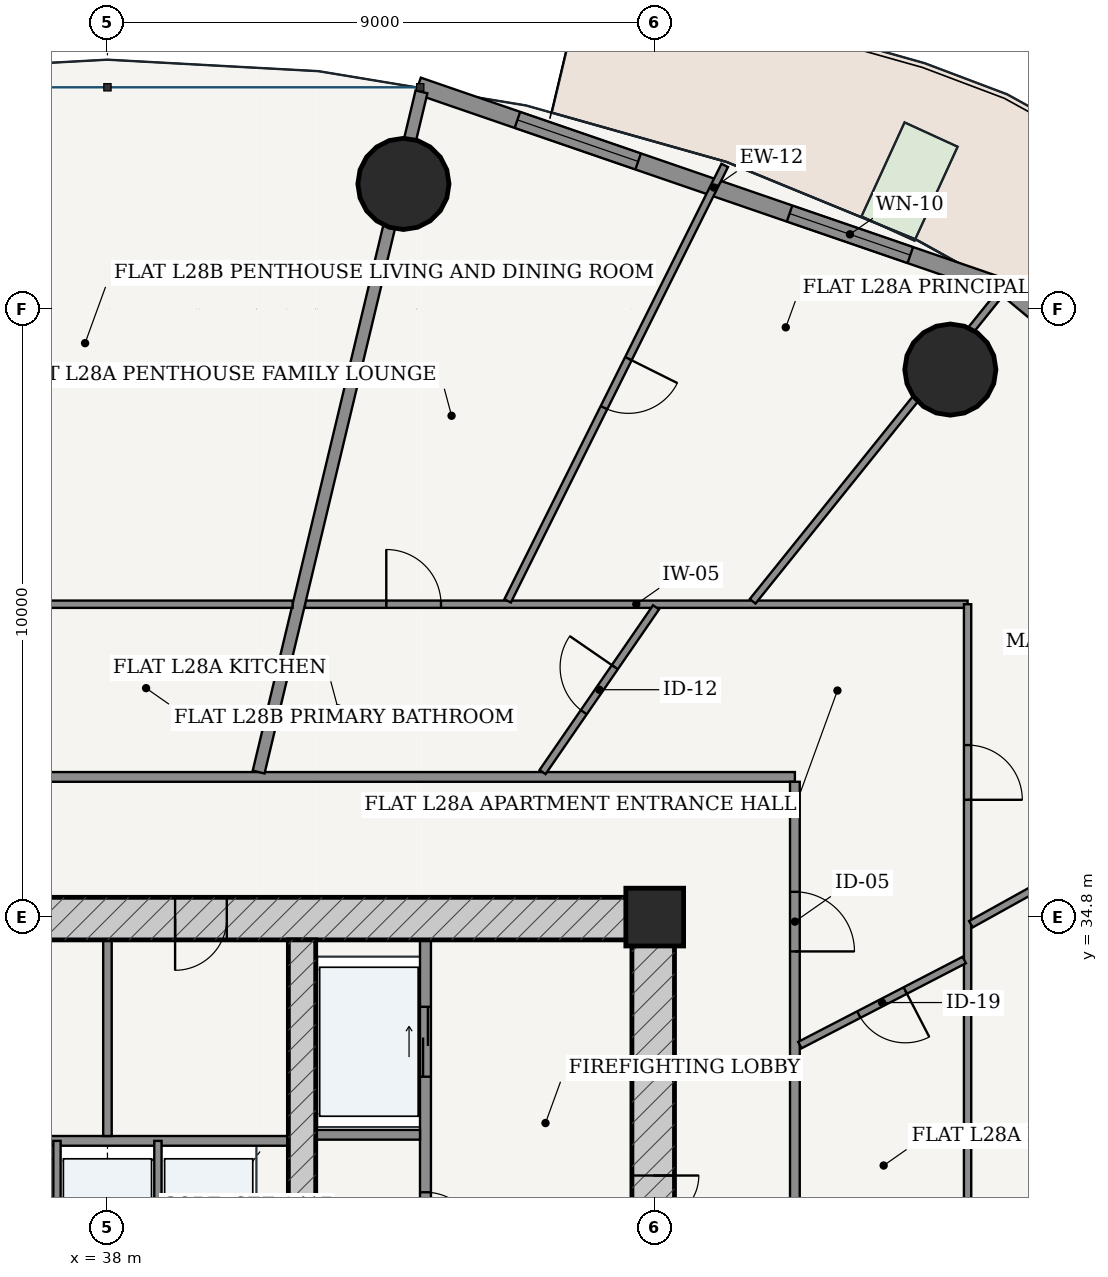
"""IFC4 building model, lengths in metres.
Left out: names, types, materials, properties, quantities, classifications, styles, units other than length and angle.
Written with IfcOpenShell. Run it as: python <this file> out.ifc"""

import sys

from ifc_helpers import new_model, si_unit, direction, frame, frame_2d, origin, origin_2d, place, context, subcontext, project, spatial, rectangle, hollow_circle, extrude, source, transform, mapped, element, fill, save


model = new_model("IFC4")
c1 = context("Model", 3, precision=1e-05, world=origin(), true_north=direction((-0.2419218956, 0.970295726276)))
c2 = subcontext(c1, "Body", "Model", "MODEL_VIEW")
j1 = project(units=[si_unit("LENGTHUNIT", "METRE"), si_unit("PLANEANGLEUNIT", "RADIAN")], contexts=[c1])
p1 = place(None, origin())
s1 = spatial("IfcSite", under=j1, at=p1, CompositionType="ELEMENT")
p2 = place(p1, origin())
s2 = spatial("IfcBuilding", under=s1, at=p2, CompositionType="ELEMENT")
p3 = place(p2, frame((0.0, 0.0, 108.6)))
s3 = spatial("IfcBuildingStorey", under=s2, at=p3, CompositionType="ELEMENT", Elevation=108.6)
p4 = place(p3, frame((47.0, 34.8, 0.0), z_axis=(0.0, 0.0, 1.0), x_axis=(1.0, 0.0, 0.0)))
e1 = element("IfcColumn", 1, at=p4, inside=s3, PredefinedType="COLUMN", context=c2, shape_type="SweptSolid", body=[
    extrude(rectangle(XDim=0.95, YDim=0.95, at=origin_2d()), origin(), (0.0, 0.0, 1.0), 3.6),
])
p5 = place(p3, frame((28.675, 34.775, 0.0), z_axis=(0.0, 0.0, 1.0), x_axis=(1.0, 0.0, 0.0)))
e2 = element("IfcWall", 2, at=p5, inside=s3, PredefinedType="SHEAR", context=c2, shape_type="SweptSolid", body=[
    extrude(rectangle(XDim=18.65, YDim=0.7, at=frame_2d((9.325, 0.0))), origin(), (0.0, 0.0, 1.0), 3.325),
])
p6 = place(p5, frame((7.357, 0.0, 0.0)))
e3 = element("IfcOpeningElement", 3, at=p6, cuts=e2, PredefinedType="OPENING", context=c2, shape_type="SweptSolid", body=[
    extrude(rectangle(XDim=0.86, YDim=2.1, at=frame_2d((0.43, 1.05))), frame((0.0, 0.36, 0.0), z_axis=(0.0, -1.0, 0.0), x_axis=(1.0, 0.0, 0.0)), (0.0, 0.0, 1.0), 0.72),
])
p7 = place(p5, frame((10.438, 0.0, 0.0)))
e4 = element("IfcOpeningElement", 4, at=p7, cuts=e2, PredefinedType="OPENING", context=c2, shape_type="SweptSolid", body=[
    extrude(rectangle(XDim=0.85, YDim=2.1, at=frame_2d((0.425, 1.05))), frame((0.0, 0.36, 0.0), z_axis=(0.0, -1.0, 0.0), x_axis=(1.0, 0.0, 0.0)), (0.0, 0.0, 1.0), 0.72),
])
p8 = place(p3, frame((46.975, 19.175, 0.0), z_axis=(0.0, 0.0, 1.0), x_axis=(0.0, 1.0, 0.0)))
e5 = element("IfcWall", 5, at=p8, inside=s3, PredefinedType="SHEAR", context=c2, shape_type="SweptSolid", body=[
    extrude(rectangle(XDim=15.25, YDim=0.7, at=frame_2d((7.625, 0.0))), origin(), (0.0, 0.0, 1.0), 3.325),
])
p9 = place(p8, frame((9.875, 0.0, 0.0)))
e6 = element("IfcOpeningElement", 6, at=p9, cuts=e5, PredefinedType="OPENING", context=c2, shape_type="SweptSolid", body=[
    extrude(rectangle(XDim=1.5, YDim=2.2, at=frame_2d((0.75, 1.1))), frame((0.0, 0.36, 0.0), z_axis=(0.0, -1.0, 0.0), x_axis=(1.0, 0.0, 0.0)), (0.0, 0.0, 1.0), 0.72),
])
p10 = place(p3, frame((41.2, 19.175, 0.0), z_axis=(0.0, 0.0, 1.0), x_axis=(0.0, 1.0, 0.0)))
e7 = element("IfcWall", 7, at=p10, inside=s3, PredefinedType="SHEAR", context=c2, shape_type="SweptSolid", body=[
    extrude(rectangle(XDim=15.25, YDim=0.45, at=frame_2d((7.625, 0.0))), origin(), (0.0, 0.0, 1.0), 3.325),
])
p11 = place(p10, frame((7.8, 0.0, 0.0)))
e8 = element("IfcOpeningElement", 8, at=p11, cuts=e7, PredefinedType="OPENING", context=c2, shape_type="SweptSolid", body=[
    extrude(rectangle(XDim=1.05, YDim=2.15, at=frame_2d((0.525, 1.075))), frame((0.0, 0.235, 0.0), z_axis=(0.0, -1.0, 0.0), x_axis=(1.0, 0.0, 0.0)), (0.0, 0.0, 1.0), 0.47),
])
for number, where, z_axis, x_axis in (
    (9, (51.862, 43.803, 0.0), (0.0, 0.0, 1.0), (1.0, 0.0, 0.0)),
    (10, (42.867, 46.857, 0.0), (0.0, 0.0, 1.0), (1.0, 0.0, 0.0)),
):
    element("IfcColumn", number, at=place(p3, frame(where, z_axis=z_axis, x_axis=x_axis)), inside=s3, PredefinedType="COLUMN", context=c2, shape_type="SweptSolid", body=[
        extrude(hollow_circle(Radius=0.75, WallThickness=0.045, at=origin_2d()), origin(), (0.0, 0.0, 1.0), 3.6),
    ])
p12 = place(p3, frame((60.154, 39.01, 0.0), z_axis=(0.0, 0.0, 1.0), x_axis=(-0.769242574941, 0.638956853706, 0.0)))
e11 = element("IfcWall", 11, at=p12, inside=s3, PredefinedType="SOLIDWALL", context=c2, shape_type="SweptSolid", body=[
    extrude(rectangle(XDim=9.69, YDim=0.26, at=frame_2d((4.845, 0.0))), origin(), (0.0, 0.0, 1.0), 3.325),
])
p13 = place(p12, frame((4.17, 0.0, 0.0)))
e12 = element("IfcOpeningElement", 12, at=p13, cuts=e11, PredefinedType="OPENING", context=c2, shape_type="SweptSolid", body=[
    extrude(rectangle(XDim=1.35, YDim=2.2, at=frame_2d((0.675, 1.1))), frame((0.0, 0.14, 0.0), z_axis=(0.0, -1.0, 0.0), x_axis=(1.0, 0.0, 0.0)), (0.0, 0.0, 1.0), 0.28),
])
p14 = place(p3, frame((52.837, 45.125, 0.0), z_axis=(0.0, 0.0, 1.0), x_axis=(-0.945597432299, 0.325339047809, 0.0)))
e13 = element("IfcWall", 13, at=p14, inside=s3, PredefinedType="SOLIDWALL", context=c2, shape_type="SweptSolid", body=[
    extrude(rectangle(XDim=10.289, YDim=0.28, at=frame_2d((5.145, 0.0))), origin(), (0.0, 0.0, 1.0), 3.325),
])
p15 = place(p14, frame((1.728, 0.0, 0.85)))
e14 = element("IfcOpeningElement", 14, at=p15, cuts=e13, PredefinedType="OPENING", context=c2, shape_type="SweptSolid", body=[
    extrude(rectangle(XDim=2.1, YDim=1.95, at=frame_2d((1.05, 0.975))), frame((0.0, 0.15, 0.0), z_axis=(0.0, -1.0, 0.0), x_axis=(1.0, 0.0, 0.0)), (0.0, 0.0, 1.0), 0.3),
])
p16 = place(p14, frame((6.461, 0.0, 0.85)))
e15 = element("IfcOpeningElement", 15, at=p16, cuts=e13, PredefinedType="OPENING", context=c2, shape_type="SweptSolid", body=[
    extrude(rectangle(XDim=2.1, YDim=1.95, at=frame_2d((1.05, 0.975))), frame((0.0, 0.15, 0.0), z_axis=(0.0, -1.0, 0.0), x_axis=(1.0, 0.0, 0.0)), (0.0, 0.0, 1.0), 0.3),
])
p17 = place(p3, frame((43.23, 28.52, 0.0), z_axis=(0.0, 0.0, 1.0), x_axis=(0.0, 1.0, 0.0)))
e16 = element("IfcWall", 16, at=p17, inside=s3, PredefinedType="PARTITIONING", context=c2, shape_type="SweptSolid", body=[
    extrude(rectangle(XDim=5.905, YDim=0.18, at=frame_2d((2.953, 0.0))), origin(), (0.0, 0.0, 1.0), 3.325),
])
p18 = place(p17, frame((0.905, 0.0, 0.0)))
e17 = element("IfcOpeningElement", 17, at=p18, cuts=e16, PredefinedType="OPENING", context=c2, shape_type="SweptSolid", body=[
    extrude(rectangle(XDim=0.85, YDim=2.1, at=frame_2d((0.425, 1.05))), frame((0.0, 0.1, 0.0), z_axis=(0.0, -1.0, 0.0), x_axis=(1.0, 0.0, 0.0)), (0.0, 0.0, 1.0), 0.2),
])
p19 = place(p17, frame((3.655, 0.0, 0.0)))
e18 = element("IfcOpeningElement", 18, at=p19, cuts=e16, PredefinedType="OPENING", context=c2, shape_type="SweptSolid", body=[
    extrude(rectangle(XDim=1.15, YDim=2.2, at=frame_2d((0.575, 1.1))), frame((0.0, 0.1, 0.0), z_axis=(0.0, -1.0, 0.0), x_axis=(1.0, 0.0, 0.0)), (0.0, 0.0, 1.0), 0.2),
])
p20 = place(p3, frame((41.425, 31.22, 0.0), z_axis=(0.0, 0.0, 1.0), x_axis=(1.0, 0.0, 0.0)))
e19 = element("IfcWall", 19, at=p20, inside=s3, PredefinedType="PARTITIONING", context=c2, shape_type="SweptSolid", body=[
    extrude(rectangle(XDim=1.715, YDim=0.16, at=frame_2d((0.857, 0.0))), origin(), (0.0, 0.0, 1.0), 3.325),
])
p21 = place(p3, frame((35.025, 31.12, 0.0), z_axis=(0.0, 0.0, 1.0), x_axis=(1.0, 0.0, 0.0)))
e20 = element("IfcWall", 20, at=p21, inside=s3, PredefinedType="PARTITIONING", context=c2, shape_type="SweptSolid", body=[
    extrude(rectangle(XDim=5.95, YDim=0.16, at=frame_2d((2.975, 0.0))), origin(), (0.0, 0.0, 1.0), 3.325),
])
for number, where, z_axis, x_axis in (
    (21, (37.17, 28.56, 0.0), (0.0, 0.0, 1.0), (0.0, 1.0, 0.0)),
    (22, (38.83, 28.56, 0.0), (0.0, 0.0, 1.0), (0.0, 1.0, 0.0)),
):
    element("IfcWall", number, at=place(p3, frame(where, z_axis=z_axis, x_axis=x_axis)), inside=s3, PredefinedType="PARTITIONING", context=c2, shape_type="SweptSolid", body=[
        extrude(rectangle(XDim=2.56, YDim=0.12, at=frame_2d((1.28, 0.0))), origin(), (0.0, 0.0, 1.0), 3.325),
    ])
p22 = place(p3, frame((38.0, 31.2, 0.0), z_axis=(0.0, 0.0, 1.0), x_axis=(0.0, 1.0, 0.0)))
e23 = element("IfcWall", 23, at=p22, inside=s3, PredefinedType="PARTITIONING", context=c2, shape_type="SweptSolid", body=[
    extrude(rectangle(XDim=3.225, YDim=0.14, at=frame_2d((1.613, 0.0))), origin(), (0.0, 0.0, 1.0), 3.325),
])
p23 = place(p3, frame((26.695, 37.105, 0.0), z_axis=(0.0, 0.0, 1.0), x_axis=(1.0, 0.0, 0.0)))
e24 = element("IfcWall", 24, at=p23, inside=s3, PredefinedType="PARTITIONING", context=c2, shape_type="SweptSolid", body=[
    extrude(rectangle(XDim=22.61, YDim=0.16, at=frame_2d((11.305, 0.0))), origin(), (0.0, 0.0, 1.0), 2.767),
])
p24 = place(p23, frame((4.925, 0.0, 0.0)))
e25 = element("IfcOpeningElement", 25, at=p24, cuts=e24, PredefinedType="OPENING", context=c2, shape_type="SweptSolid", body=[
    extrude(rectangle(XDim=0.98, YDim=2.2, at=frame_2d((0.49, 1.1))), frame((0.0, 0.09, 0.0), z_axis=(0.0, -1.0, 0.0), x_axis=(1.0, 0.0, 0.0)), (0.0, 0.0, 1.0), 0.18),
])
p25 = place(p3, frame((49.305, 16.575, 0.0), z_axis=(0.0, 0.0, 1.0), x_axis=(0.0, 1.0, 0.0)))
e26 = element("IfcWall", 26, at=p25, inside=s3, PredefinedType="PARTITIONING", context=c2, shape_type="SweptSolid", body=[
    extrude(rectangle(XDim=20.45, YDim=0.16, at=frame_2d((10.225, 0.0))), origin(), (0.0, 0.0, 1.0), 2.767),
])
p26 = place(p25, frame((17.66, 0.0, 0.0)))
e27 = element("IfcOpeningElement", 27, at=p26, cuts=e26, PredefinedType="OPENING", context=c2, shape_type="SweptSolid", body=[
    extrude(rectangle(XDim=0.98, YDim=2.2, at=frame_2d((0.49, 1.1))), frame((0.0, 0.09, 0.0), z_axis=(0.0, -1.0, 0.0), x_axis=(1.0, 0.0, 0.0)), (0.0, 0.0, 1.0), 0.18),
])
p27 = place(p3, frame((49.387, 28.682, 0.0), z_axis=(0.0, 0.0, 1.0), x_axis=(0.986617934215, 0.163049231479, 0.0)))
e28 = element("IfcWall", 28, at=p27, inside=s3, PredefinedType="PARTITIONING", context=c2, shape_type="SweptSolid", body=[
    extrude(rectangle(XDim=14.785, YDim=0.2, at=frame_2d((7.392, 0.0))), origin(), (0.0, 0.0, 1.0), 2.767),
])
p28 = place(p3, frame((41.249, 39.945, 0.0), z_axis=(0.0, 0.0, 1.0), x_axis=(1.0, 0.0, 0.0)))
e29 = element("IfcWall", 29, at=p28, inside=s3, PredefinedType="PARTITIONING", context=c2, shape_type="SweptSolid", body=[
    extrude(rectangle(XDim=10.896, YDim=0.12, at=frame_2d((5.448, 0.0))), origin(), (0.0, 0.0, 1.0), 2.767),
])
p29 = place(p28, frame((1.336, 0.0, 0.0)))
e30 = element("IfcOpeningElement", 30, at=p29, cuts=e29, PredefinedType="OPENING", context=c2, shape_type="SweptSolid", body=[
    extrude(rectangle(XDim=0.9, YDim=2.15, at=frame_2d((0.45, 1.075))), frame((0.0, 0.07, 0.0), z_axis=(0.0, -1.0, 0.0), x_axis=(1.0, 0.0, 0.0)), (0.0, 0.0, 1.0), 0.14),
])
p30 = place(p3, frame((52.145, 39.945, 0.0), z_axis=(0.0, 0.0, 1.0), x_axis=(0.0, -1.0, 0.0)))
e31 = element("IfcWall", 31, at=p30, inside=s3, PredefinedType="PARTITIONING", context=c2, shape_type="SweptSolid", body=[
    extrude(rectangle(XDim=10.705, YDim=0.12, at=frame_2d((5.353, 0.0))), origin(), (0.0, 0.0, 1.0), 2.767),
])
p31 = place(p30, frame((2.316, 0.0, 0.0)))
e32 = element("IfcOpeningElement", 32, at=p31, cuts=e31, PredefinedType="OPENING", context=c2, shape_type="SweptSolid", body=[
    extrude(rectangle(XDim=0.9, YDim=2.15, at=frame_2d((0.45, 1.075))), frame((0.0, 0.07, 0.0), z_axis=(0.0, -1.0, 0.0), x_axis=(1.0, 0.0, 0.0)), (0.0, 0.0, 1.0), 0.14),
])
p32 = place(p3, frame((52.199, 34.683, 0.0), z_axis=(0.0, 0.0, 1.0), x_axis=(0.874320827228, 0.485348422349, 0.0)))
e33 = element("IfcWall", 33, at=p32, inside=s3, PredefinedType="PARTITIONING", context=c2, shape_type="SweptSolid", body=[
    extrude(rectangle(XDim=8.94, YDim=0.12, at=frame_2d((4.47, 0.0))), origin(), (0.0, 0.0, 1.0), 2.767),
])
p33 = place(p32, frame((2.953, 0.0, 0.0)))
e34 = element("IfcOpeningElement", 34, at=p33, cuts=e33, PredefinedType="OPENING", context=c2, shape_type="SweptSolid", body=[
    extrude(rectangle(XDim=0.9, YDim=2.15, at=frame_2d((0.45, 1.075))), frame((0.0, 0.07, 0.0), z_axis=(0.0, -1.0, 0.0), x_axis=(1.0, 0.0, 0.0)), (0.0, 0.0, 1.0), 0.14),
])
p34 = place(p3, frame((48.611, 39.993, 0.0), z_axis=(0.0, 0.0, 1.0), x_axis=(0.626719700294, 0.779244773651, 0.0)))
e35 = element("IfcWall", 35, at=p34, inside=s3, PredefinedType="PARTITIONING", context=c2, shape_type="SweptSolid", body=[
    extrude(rectangle(XDim=6.537, YDim=0.12, at=frame_2d((3.269, 0.0))), origin(), (0.0, 0.0, 1.0), 2.767),
])
p35 = place(p3, frame((44.581, 40.0, 0.0), z_axis=(0.0, 0.0, 1.0), x_axis=(0.446188142997, 0.894939182877, 0.0)))
e36 = element("IfcWall", 36, at=p35, inside=s3, PredefinedType="PARTITIONING", context=c2, shape_type="SweptSolid", body=[
    extrude(rectangle(XDim=8.002, YDim=0.12, at=frame_2d((4.001, 0.0))), origin(), (0.0, 0.0, 1.0), 2.767),
])
p36 = place(p35, frame((3.551, 0.0, 0.0)))
e37 = element("IfcOpeningElement", 37, at=p36, cuts=e36, PredefinedType="OPENING", context=c2, shape_type="SweptSolid", body=[
    extrude(rectangle(XDim=0.9, YDim=2.15, at=frame_2d((0.45, 1.075))), frame((0.0, 0.07, 0.0), z_axis=(0.0, -1.0, 0.0), x_axis=(1.0, 0.0, 0.0)), (0.0, 0.0, 1.0), 0.14),
])
p37 = place(p3, frame((49.387, 32.695, 0.0), z_axis=(0.0, 0.0, 1.0), x_axis=(0.888050549489, 0.459745822767, 0.0)))
e38 = element("IfcWall", 38, at=p37, inside=s3, PredefinedType="PARTITIONING", context=c2, shape_type="SweptSolid", body=[
    extrude(rectangle(XDim=3.044, YDim=0.12, at=frame_2d((1.522, 0.0))), origin(), (0.0, 0.0, 1.0), 3.325),
])
p38 = place(p37, frame((1.092, 0.0, 0.0)))
e39 = element("IfcOpeningElement", 39, at=p38, cuts=e38, PredefinedType="OPENING", context=c2, shape_type="SweptSolid", body=[
    extrude(rectangle(XDim=0.86, YDim=2.15, at=frame_2d((0.43, 1.075))), frame((0.0, 0.07, 0.0), z_axis=(0.0, -1.0, 0.0), x_axis=(1.0, 0.0, 0.0)), (0.0, 0.0, 1.0), 0.14),
])
p39 = place(p3, frame((45.155, 37.185, 0.0), z_axis=(0.0, 0.0, 1.0), x_axis=(0.567360037454, 0.823469846382, 0.0)))
e40 = element("IfcWall", 40, at=p39, inside=s3, PredefinedType="PARTITIONING", context=c2, shape_type="SweptSolid", body=[
    extrude(rectangle(XDim=3.29, YDim=0.12, at=frame_2d((1.645, 0.0))), origin(), (0.0, 0.0, 1.0), 3.004),
])
p40 = place(p39, frame((1.195, 0.0, 0.0)))
e41 = element("IfcOpeningElement", 41, at=p40, cuts=e40, PredefinedType="OPENING", context=c2, shape_type="SweptSolid", body=[
    extrude(rectangle(XDim=0.9, YDim=2.15, at=frame_2d((0.45, 1.075))), frame((0.0, 0.07, 0.0), z_axis=(0.0, -1.0, 0.0), x_axis=(1.0, 0.0, 0.0)), (0.0, 0.0, 1.0), 0.14),
])
p41 = place(p3, frame((40.486, 37.185, 0.0), z_axis=(0.0, 0.0, 1.0), x_axis=(0.232834224261, 0.972516438942, 0.0)))
e42 = element("IfcWall", 42, at=p41, inside=s3, PredefinedType="PARTITIONING", context=c2, shape_type="SweptSolid", body=[
    extrude(rectangle(XDim=11.502, YDim=0.2, at=frame_2d((5.751, 0.0))), origin(), (0.0, 0.0, 1.0), 2.767),
])
p42 = place(p3, frame((23.855, 39.945, 0.0), z_axis=(0.0, 0.0, 1.0), x_axis=(1.0, 0.0, 0.0)))
e43 = element("IfcWall", 43, at=p42, inside=s3, PredefinedType="PARTITIONING", context=c2, shape_type="SweptSolid", body=[
    extrude(rectangle(XDim=17.19, YDim=0.12, at=frame_2d((8.595, 0.0))), origin(), (0.0, 0.0, 1.0), 2.767),
])
p43 = place(p42, frame((9.133, 0.0, 0.0)))
e44 = element("IfcOpeningElement", 44, at=p43, cuts=e43, PredefinedType="OPENING", context=c2, shape_type="SweptSolid", body=[
    extrude(rectangle(XDim=0.9, YDim=2.15, at=frame_2d((0.45, 1.075))), frame((0.0, 0.07, 0.0), z_axis=(0.0, -1.0, 0.0), x_axis=(1.0, 0.0, 0.0)), (0.0, 0.0, 1.0), 0.14),
])
m1 = source(origin(), c2, "Body", "SweptSolid", [
    extrude(rectangle(XDim=2.1, YDim=1.95, at=frame_2d((1.05, 0.975))), frame((0.0, 0.03, 0.0), z_axis=(0.0, -1.0, 0.0), x_axis=(1.0, 0.0, 0.0)), (0.0, 0.0, 1.0), 0.06),
])
p44 = place(p15, origin())
e45 = element("IfcWindow", 45, at=p44, inside=s3, PartitioningType="SINGLE_PANEL", PredefinedType="WINDOW", context=c2, shape_type="MappedRepresentation", body=[
    mapped(m1, transform((0.0, 0.0, 0.0), scale=1.0)),
])
fill(e14, e45)
p45 = place(p16, origin())
e46 = element("IfcWindow", 46, at=p45, inside=s3, PartitioningType="SINGLE_PANEL", PredefinedType="WINDOW", context=c2, shape_type="MappedRepresentation", body=[
    mapped(m1, transform((0.0, 0.0, 0.0), scale=1.0)),
])
fill(e15, e46)
m2 = source(origin(), c2, "Body", "SweptSolid", [
    extrude(rectangle(XDim=1.5, YDim=2.2, at=frame_2d((0.75, 1.1))), frame((0.0, 0.025, 0.0), z_axis=(0.0, -1.0, 0.0), x_axis=(1.0, 0.0, 0.0)), (0.0, 0.0, 1.0), 0.05),
])
p46 = place(p9, frame((1.5, 0.0, 0.0), z_axis=(0.0, 0.0, 1.0), x_axis=(-1.0, 0.0, 0.0)))
e47 = element("IfcDoor", 47, at=p46, inside=s3, OperationType="DOUBLE_DOOR_SINGLE_SWING", PredefinedType="DOOR", context=c2, shape_type="MappedRepresentation", body=[
    mapped(m2, transform((0.0, 0.0, 0.0), scale=1.0)),
])
fill(e6, e47)
m3 = source(origin(), c2, "Body", "SweptSolid", [
    extrude(rectangle(XDim=0.85, YDim=2.1, at=frame_2d((0.425, 1.05))), frame((0.0, 0.025, 0.0), z_axis=(0.0, -1.0, 0.0), x_axis=(1.0, 0.0, 0.0)), (0.0, 0.0, 1.0), 0.05),
])
p47 = place(p18, frame((0.85, 0.0, 0.0), z_axis=(0.0, 0.0, 1.0), x_axis=(-1.0, 0.0, 0.0)))
e48 = element("IfcDoor", 48, at=p47, inside=s3, OperationType="SINGLE_SWING_RIGHT", PredefinedType="DOOR", context=c2, shape_type="MappedRepresentation", body=[
    mapped(m3, transform((0.0, 0.0, 0.0), scale=1.0)),
])
fill(e17, e48)
p48 = place(p7, frame((0.85, 0.0, 0.0), z_axis=(0.0, 0.0, 1.0), x_axis=(-1.0, 0.0, 0.0)))
e49 = element("IfcDoor", 49, at=p48, inside=s3, OperationType="SINGLE_SWING_RIGHT", PredefinedType="DOOR", context=c2, shape_type="MappedRepresentation", body=[
    mapped(m3, transform((0.0, 0.0, 0.0), scale=1.0)),
])
fill(e4, e49)
m4 = source(origin(), c2, "Body", "SweptSolid", [
    extrude(rectangle(XDim=1.15, YDim=2.2, at=frame_2d((0.575, 1.1))), frame((0.0, 0.025, 0.0), z_axis=(0.0, -1.0, 0.0), x_axis=(1.0, 0.0, 0.0)), (0.0, 0.0, 1.0), 0.05),
])
p49 = place(p19, origin())
e50 = element("IfcDoor", 50, at=p49, inside=s3, OperationType="DOUBLE_DOOR_SLIDING", PredefinedType="DOOR", context=c2, shape_type="MappedRepresentation", body=[
    mapped(m4, transform((0.0, 0.0, 0.0), scale=1.0)),
])
fill(e18, e50)
m5 = source(origin(), c2, "Body", "SweptSolid", [
    extrude(rectangle(XDim=0.98, YDim=2.2, at=frame_2d((0.49, 1.1))), frame((0.0, 0.025, 0.0), z_axis=(0.0, -1.0, 0.0), x_axis=(1.0, 0.0, 0.0)), (0.0, 0.0, 1.0), 0.05),
])
p50 = place(p26, frame((0.98, 0.0, 0.0), z_axis=(0.0, 0.0, 1.0), x_axis=(-1.0, 0.0, 0.0)))
e51 = element("IfcDoor", 51, at=p50, inside=s3, OperationType="SINGLE_SWING_RIGHT", PredefinedType="DOOR", context=c2, shape_type="MappedRepresentation", body=[
    mapped(m5, transform((0.0, 0.0, 0.0), scale=1.0)),
])
fill(e27, e51)
m6 = source(origin(), c2, "Body", "SweptSolid", [
    extrude(rectangle(XDim=0.86, YDim=2.15, at=frame_2d((0.43, 1.075))), frame((0.0, 0.025, 0.0), z_axis=(0.0, -1.0, 0.0), x_axis=(1.0, 0.0, 0.0)), (0.0, 0.0, 1.0), 0.05),
])
p51 = place(p38, frame((0.86, 0.0, 0.0), z_axis=(0.0, 0.0, 1.0), x_axis=(-1.0, 0.0, 0.0)))
e52 = element("IfcDoor", 52, at=p51, inside=s3, OperationType="SINGLE_SWING_LEFT", PredefinedType="DOOR", context=c2, shape_type="MappedRepresentation", body=[
    mapped(m6, transform((0.0, 0.0, 0.0), scale=1.0)),
])
fill(e39, e52)
m7 = source(origin(), c2, "Body", "SweptSolid", [
    extrude(rectangle(XDim=0.9, YDim=2.15, at=frame_2d((0.45, 1.075))), frame((0.0, 0.025, 0.0), z_axis=(0.0, -1.0, 0.0), x_axis=(1.0, 0.0, 0.0)), (0.0, 0.0, 1.0), 0.05),
])
p52 = place(p40, origin())
e53 = element("IfcDoor", 53, at=p52, inside=s3, OperationType="SINGLE_SWING_RIGHT", PredefinedType="DOOR", context=c2, shape_type="MappedRepresentation", body=[
    mapped(m7, transform((0.0, 0.0, 0.0), scale=1.0)),
])
fill(e41, e53)
p53 = place(p29, origin())
e54 = element("IfcDoor", 54, at=p53, inside=s3, OperationType="SINGLE_SWING_LEFT", PredefinedType="DOOR", context=c2, shape_type="MappedRepresentation", body=[
    mapped(m7, transform((0.0, 0.0, 0.0), scale=1.0)),
])
fill(e30, e54)
p54 = place(p31, origin())
e55 = element("IfcDoor", 55, at=p54, inside=s3, OperationType="SINGLE_SWING_RIGHT", PredefinedType="DOOR", context=c2, shape_type="MappedRepresentation", body=[
    mapped(m7, transform((0.0, 0.0, 0.0), scale=1.0)),
])
fill(e32, e55)
p55 = place(p36, frame((0.9, 0.0, 0.0), z_axis=(0.0, 0.0, 1.0), x_axis=(-1.0, 0.0, 0.0)))
e56 = element("IfcDoor", 56, at=p55, inside=s3, OperationType="SINGLE_SWING_LEFT", PredefinedType="DOOR", context=c2, shape_type="MappedRepresentation", body=[
    mapped(m7, transform((0.0, 0.0, 0.0), scale=1.0)),
])
fill(e37, e56)
save(model, sys.argv[1])
